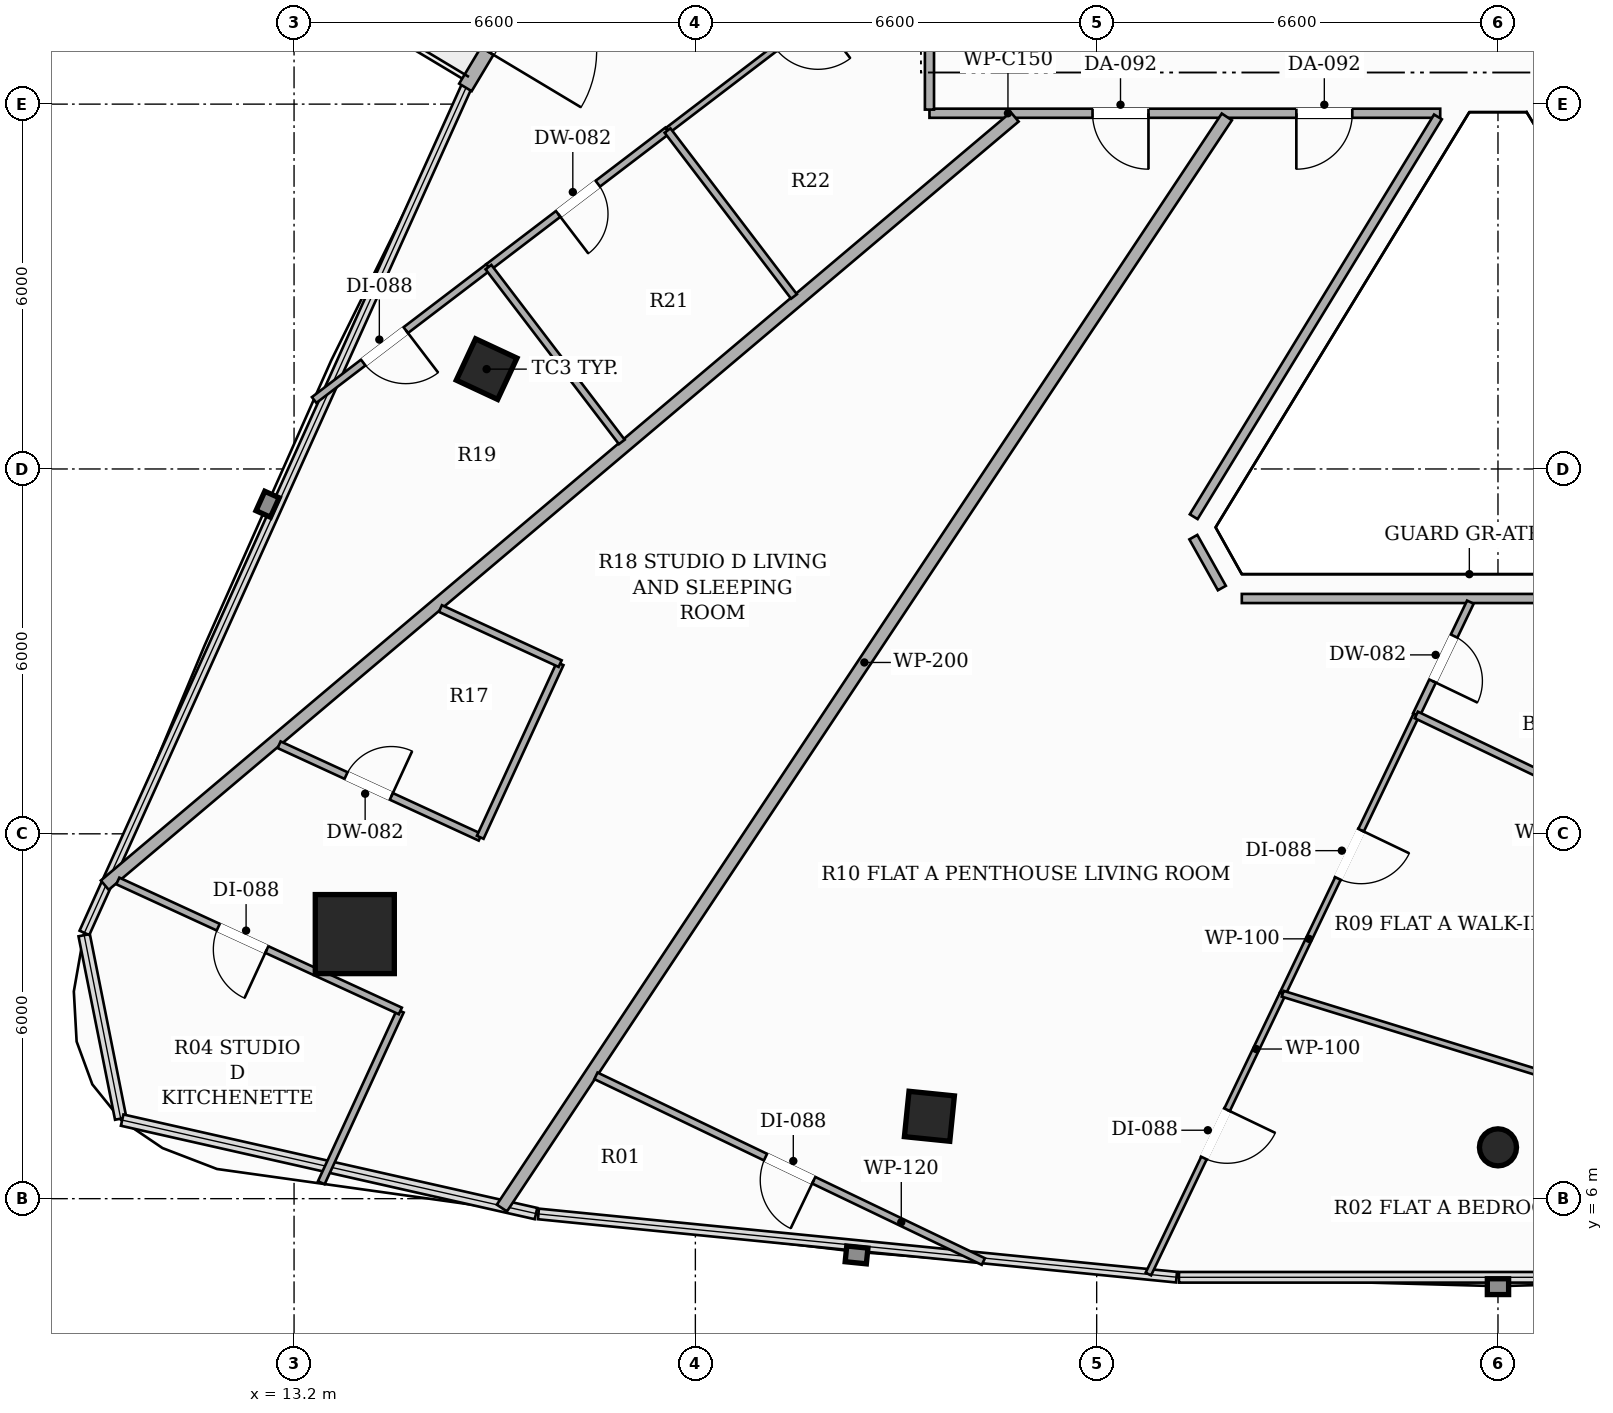
"""IFC4 building model, lengths in metres.
Left out: names, types, materials, properties, quantities, classifications, styles, units other than length and angle.
Written with IfcOpenShell. Run it as: python <this file> out.ifc"""

import sys

from ifc_helpers import new_model, si_unit, direction, frame, frame_2d, origin, origin_2d, place, context, subcontext, project, spatial, rectangle, hollow_rectangle, hollow_circle, extrude, element, fill, save


model = new_model("IFC4")
c1 = context("Model", 3, precision=1e-05, world=origin(), true_north=direction((0.0, 1.0)))
c2 = subcontext(c1, "Body", "Model", "MODEL_VIEW")
j1 = project(units=[si_unit("LENGTHUNIT", "METRE"), si_unit("PLANEANGLEUNIT", "RADIAN")], contexts=[c1])
p1 = place(None, origin())
s1 = spatial("IfcSite", under=j1, at=p1, CompositionType="ELEMENT")
p2 = place(p1, origin())
s2 = spatial("IfcBuilding", under=s1, at=p2, CompositionType="ELEMENT")
p3 = place(p2, frame((0.0, 0.0, 209.6)))
s3 = spatial("IfcBuildingStorey", under=s2, at=p3, CompositionType="ELEMENT", Elevation=209.6)
p4 = place(p3, frame((14.199, 10.351, 0.0), z_axis=(0.0, 0.0, 1.0), x_axis=(1.0, 0.0, 0.0)))
e1 = element("IfcColumn", 1, at=p4, inside=s3, PredefinedType="COLUMN", context=c2, shape_type="SweptSolid", body=[
    extrude(hollow_rectangle(XDim=1.3, YDim=1.3, WallThickness=0.04, at=origin_2d()), origin(), (0.0, 0.0, 1.0), 3.3),
])
for number, where, z_axis, x_axis in (
    (2, (16.367, 19.642, 0.0), (0.0, 0.0, 1.0), (0.423, 0.906, 0.0)),
    (3, (23.649, 7.355, 0.0), (0.0, 0.0, 1.0), (-0.995, 0.101, 0.0)),
):
    element("IfcColumn", number, at=place(p3, frame(where, z_axis=z_axis, x_axis=x_axis)), inside=s3, PredefinedType="COLUMN", context=c2, shape_type="SweptSolid", body=[
        extrude(hollow_rectangle(XDim=0.75, YDim=0.75, WallThickness=0.025, at=origin_2d()), origin(), (0.0, 0.0, 1.0), 3.3),
    ])
p5 = place(p3, frame((33.0, 6.844, 0.0), z_axis=(0.0, 0.0, 1.0), x_axis=(1.0, 0.0, 0.0)))
e4 = element("IfcColumn", 4, at=p5, inside=s3, PredefinedType="COLUMN", context=c2, shape_type="SweptSolid", body=[
    extrude(hollow_circle(Radius=0.305, WallThickness=0.016, at=origin_2d()), origin(), (0.0, 0.0, 1.0), 3.3),
])
p6 = place(p3, frame((21.353, 33.169, 0.0), z_axis=(0.0, 0.0, 1.0), x_axis=(-0.514391899557, -0.857555230682, 0.0)))
e5 = element("IfcWall", 5, at=p6, inside=s3, PredefinedType="SOLIDWALL", context=c2, shape_type="SweptSolid", body=[
    extrude(rectangle(XDim=10.371, YDim=0.24, at=frame_2d((5.186, 0.0))), origin(), (0.0, 0.0, 1.0), 2.624),
])
p7 = place(p6, frame((7.874, 0.0, 0.0)))
e6 = element("IfcOpeningElement", 6, at=p7, cuts=e5, PredefinedType="OPENING", context=c2, shape_type="SweptSolid", body=[
    extrude(rectangle(XDim=1.8, YDim=2.2, at=frame_2d((0.9, 1.1))), frame((0.0, 0.13, 0.0), z_axis=(0.0, -1.0, 0.0), x_axis=(1.0, 0.0, 0.0)), (0.0, 0.0, 1.0), 0.26),
])
p8 = place(p3, frame((32.05, 23.85, 0.0), z_axis=(0.0, 0.0, 1.0), x_axis=(-1.0, 0.0, 0.0)))
e7 = element("IfcWall", 7, at=p8, inside=s3, PredefinedType="PARTITIONING", context=c2, shape_type="SweptSolid", body=[
    extrude(rectangle(XDim=8.4, YDim=0.15, at=frame_2d((4.2, 0.0))), origin(), (0.0, 0.0, 1.0), 2.565),
])
p9 = place(p8, frame((1.446, 0.0, 0.0)))
e8 = element("IfcOpeningElement", 8, at=p9, cuts=e7, PredefinedType="OPENING", context=c2, shape_type="SweptSolid", body=[
    extrude(rectangle(XDim=0.92, YDim=2.15, at=frame_2d((0.46, 1.075))), frame((0.0, 0.085, 0.0), z_axis=(0.0, -1.0, 0.0), x_axis=(1.0, 0.0, 0.0)), (0.0, 0.0, 1.0), 0.17),
])
p10 = place(p8, frame((4.798, 0.0, 0.0)))
e9 = element("IfcOpeningElement", 9, at=p10, cuts=e7, PredefinedType="OPENING", context=c2, shape_type="SweptSolid", body=[
    extrude(rectangle(XDim=0.92, YDim=2.15, at=frame_2d((0.46, 1.075))), frame((0.0, 0.085, 0.0), z_axis=(0.0, -1.0, 0.0), x_axis=(1.0, 0.0, 0.0)), (0.0, 0.0, 1.0), 0.17),
])
p11 = place(p3, frame((23.65, 23.91, 0.0), z_axis=(0.0, 0.0, 1.0), x_axis=(0.0, 1.0, 0.0)))
e10 = element("IfcWall", 10, at=p11, inside=s3, PredefinedType="PARTITIONING", context=c2, shape_type="SweptSolid", body=[
    extrude(rectangle(XDim=12.439, YDim=0.15, at=frame_2d((6.22, 0.0))), origin(), (0.0, 0.0, 1.0), 2.492),
])
p12 = place(p11, frame((5.759, 0.0, 0.0)))
e11 = element("IfcOpeningElement", 11, at=p12, cuts=e10, PredefinedType="OPENING", context=c2, shape_type="SweptSolid", body=[
    extrude(rectangle(XDim=0.92, YDim=2.15, at=frame_2d((0.46, 1.075))), frame((0.0, 0.085, 0.0), z_axis=(0.0, -1.0, 0.0), x_axis=(1.0, 0.0, 0.0)), (0.0, 0.0, 1.0), 0.17),
])
p13 = place(p3, frame((37.213, 15.87, 0.0), z_axis=(0.0, 0.0, 1.0), x_axis=(-1.0, 0.0, 0.0)))
e12 = element("IfcWall", 12, at=p13, inside=s3, PredefinedType="PARTITIONING", context=c2, shape_type="SweptSolid", body=[
    extrude(rectangle(XDim=8.426, YDim=0.15, at=frame_2d((4.213, 0.0))), origin(), (0.0, 0.0, 1.0), 2.773),
])
p14 = place(p3, frame((28.459, 16.042, 0.0), z_axis=(0.0, 0.0, 1.0), x_axis=(-0.488859069364, 0.872362774481, 0.0)))
e13 = element("IfcWall", 13, at=p14, inside=s3, PredefinedType="PARTITIONING", context=c2, shape_type="SweptSolid", body=[
    extrude(rectangle(XDim=0.959, YDim=0.15, at=frame_2d((0.48, 0.0))), origin(), (0.0, 0.0, 1.0), 3.06),
])
p15 = place(p3, frame((27.996, 17.215, 0.0), z_axis=(0.0, 0.0, 1.0), x_axis=(0.521338496894, 0.853349970209, 0.0)))
e14 = element("IfcWall", 14, at=p15, inside=s3, PredefinedType="PARTITIONING", context=c2, shape_type="SweptSolid", body=[
    extrude(rectangle(XDim=7.705, YDim=0.15, at=frame_2d((3.853, 0.0))), origin(), (0.0, 0.0, 1.0), 2.773),
])
p16 = place(p3, frame((16.618, 5.846, 0.0), z_axis=(0.0, 0.0, 1.0), x_axis=(0.553425992232, 0.832898355817, 0.0)))
e15 = element("IfcWall", 15, at=p16, inside=s3, PredefinedType="PARTITIONING", context=c2, shape_type="SweptSolid", body=[
    extrude(rectangle(XDim=21.544, YDim=0.2, at=frame_2d((10.772, 0.0))), origin(), (0.0, 0.0, 1.0), 2.492),
])
p17 = place(p3, frame((10.087, 11.156, 0.0), z_axis=(0.0, 0.0, 1.0), x_axis=(0.76410924632, 0.645086862127, 0.0)))
e16 = element("IfcWall", 16, at=p17, inside=s3, PredefinedType="PARTITIONING", context=c2, shape_type="SweptSolid", body=[
    extrude(rectangle(XDim=19.585, YDim=0.2, at=frame_2d((9.792, 0.0))), origin(), (0.0, 0.0, 1.0), 2.492),
])
p18 = place(p3, frame((32.546, 15.81, 0.0), z_axis=(0.0, 0.0, 1.0), x_axis=(-0.43214833388, -0.90180253799, 0.0)))
e17 = element("IfcWall", 17, at=p18, inside=s3, PredefinedType="PARTITIONING", context=c2, shape_type="SweptSolid", body=[
    extrude(rectangle(XDim=2.057, YDim=0.12, at=frame_2d((1.028, 0.0))), origin(), (0.0, 0.0, 1.0), 3.06),
])
p19 = place(p18, frame((0.619, 0.0, 0.0)))
e18 = element("IfcOpeningElement", 18, at=p19, cuts=e17, PredefinedType="OPENING", context=c2, shape_type="SweptSolid", body=[
    extrude(rectangle(XDim=0.82, YDim=2.1, at=frame_2d((0.41, 1.05))), frame((0.0, 0.07, 0.0), z_axis=(0.0, -1.0, 0.0), x_axis=(1.0, 0.0, 0.0)), (0.0, 0.0, 1.0), 0.14),
])
p20 = place(p3, frame((24.536, 4.966, 0.0), z_axis=(0.0, 0.0, 1.0), x_axis=(-0.901746721557, 0.432264791721, 0.0)))
e19 = element("IfcWall", 19, at=p20, inside=s3, PredefinedType="PARTITIONING", context=c2, shape_type="SweptSolid", body=[
    extrude(rectangle(XDim=7.065, YDim=0.12, at=frame_2d((3.532, 0.0))), origin(), (0.0, 0.0, 1.0), 2.619),
])
p21 = place(p20, frame((3.093, 0.0, 0.0)))
e20 = element("IfcOpeningElement", 20, at=p21, cuts=e19, PredefinedType="OPENING", context=c2, shape_type="SweptSolid", body=[
    extrude(rectangle(XDim=0.88, YDim=2.1, at=frame_2d((0.44, 1.05))), frame((0.0, 0.07, 0.0), z_axis=(0.0, -1.0, 0.0), x_axis=(1.0, 0.0, 0.0)), (0.0, 0.0, 1.0), 0.14),
])
p22 = place(p3, frame((29.459, 9.37, 0.0), z_axis=(0.0, 0.0, 1.0), x_axis=(-0.43211613455, -0.901817967364, 0.0)))
e21 = element("IfcWall", 21, at=p22, inside=s3, PredefinedType="PARTITIONING", context=c2, shape_type="SweptSolid", body=[
    extrude(rectangle(XDim=5.112, YDim=0.1, at=frame_2d((2.556, 0.0))), origin(), (0.0, 0.0, 1.0), 2.492),
])
p23 = place(p22, frame((2.116, 0.0, 0.0)))
e22 = element("IfcOpeningElement", 22, at=p23, cuts=e21, PredefinedType="OPENING", context=c2, shape_type="SweptSolid", body=[
    extrude(rectangle(XDim=0.88, YDim=2.1, at=frame_2d((0.44, 1.05))), frame((0.0, 0.06, 0.0), z_axis=(0.0, -1.0, 0.0), x_axis=(1.0, 0.0, 0.0)), (0.0, 0.0, 1.0), 0.12),
])
p24 = place(p3, frame((31.657, 13.955, 0.0), z_axis=(0.0, 0.0, 1.0), x_axis=(-0.4322861352, -0.901736489954, 0.0)))
e23 = element("IfcWall", 23, at=p24, inside=s3, PredefinedType="PARTITIONING", context=c2, shape_type="SweptSolid", body=[
    extrude(rectangle(XDim=5.084, YDim=0.1, at=frame_2d((2.542, 0.0))), origin(), (0.0, 0.0, 1.0), 3.06),
])
p25 = place(p24, frame((2.102, 0.0, 0.0)))
e24 = element("IfcOpeningElement", 24, at=p25, cuts=e23, PredefinedType="OPENING", context=c2, shape_type="SweptSolid", body=[
    extrude(rectangle(XDim=0.88, YDim=2.1, at=frame_2d((0.44, 1.05))), frame((0.0, 0.06, 0.0), z_axis=(0.0, -1.0, 0.0), x_axis=(1.0, 0.0, 0.0)), (0.0, 0.0, 1.0), 0.12),
])
p26 = place(p3, frame((36.133, 11.81, 0.0), z_axis=(0.0, 0.0, 1.0), x_axis=(-0.901797658679, 0.432158515826, 0.0)))
e25 = element("IfcWall", 25, at=p26, inside=s3, PredefinedType="PARTITIONING", context=c2, shape_type="SweptSolid", body=[
    extrude(rectangle(XDim=4.964, YDim=0.12, at=frame_2d((2.482, 0.0))), origin(), (0.0, 0.0, 1.0), 2.773),
])
p27 = place(p3, frame((29.459, 9.37, 0.0), z_axis=(0.0, 0.0, 1.0), x_axis=(0.955559226726, -0.294799193044, 0.0)))
e26 = element("IfcWall", 26, at=p27, inside=s3, PredefinedType="PARTITIONING", context=c2, shape_type="SweptSolid", body=[
    extrude(rectangle(XDim=7.839, YDim=0.1, at=frame_2d((3.92, 0.0))), origin(), (0.0, 0.0, 1.0), 2.492),
])
p28 = place(p3, frame((12.954, 13.465, 0.0), z_axis=(0.0, 0.0, 1.0), x_axis=(0.908453283004, -0.41798640241, 0.0)))
e27 = element("IfcWall", 27, at=p28, inside=s3, PredefinedType="PARTITIONING", context=c2, shape_type="SweptSolid", body=[
    extrude(rectangle(XDim=3.641, YDim=0.12, at=frame_2d((1.821, 0.0))), origin(), (0.0, 0.0, 1.0), 2.492),
])
p29 = place(p28, frame((1.212, 0.0, 0.0)))
e28 = element("IfcOpeningElement", 28, at=p29, cuts=e27, PredefinedType="OPENING", context=c2, shape_type="SweptSolid", body=[
    extrude(rectangle(XDim=0.82, YDim=2.1, at=frame_2d((0.41, 1.05))), frame((0.0, 0.07, 0.0), z_axis=(0.0, -1.0, 0.0), x_axis=(1.0, 0.0, 0.0)), (0.0, 0.0, 1.0), 0.14),
])
p30 = place(p3, frame((16.262, 11.943, 0.0), z_axis=(0.0, 0.0, 1.0), x_axis=(0.417964576431, 0.908463324988, 0.0)))
e29 = element("IfcWall", 29, at=p30, inside=s3, PredefinedType="PARTITIONING", context=c2, shape_type="SweptSolid", body=[
    extrude(rectangle(XDim=3.144, YDim=0.12, at=frame_2d((1.572, 0.0))), origin(), (0.0, 0.0, 1.0), 2.565),
])
p31 = place(p3, frame((17.576, 14.799, 0.0), z_axis=(0.0, 0.0, 1.0), x_axis=(-0.908443405033, 0.418007870562, 0.0)))
e30 = element("IfcWall", 30, at=p31, inside=s3, PredefinedType="PARTITIONING", context=c2, shape_type="SweptSolid", body=[
    extrude(rectangle(XDim=2.167, YDim=0.12, at=frame_2d((1.084, 0.0))), origin(), (0.0, 0.0, 1.0), 2.492),
])
p32 = place(p3, frame((13.648, 6.262, 0.0), z_axis=(0.0, 0.0, 1.0), x_axis=(0.418057228076, 0.90842069222, 0.0)))
e31 = element("IfcWall", 31, at=p32, inside=s3, PredefinedType="PARTITIONING", context=c2, shape_type="SweptSolid", body=[
    extrude(rectangle(XDim=3.11, YDim=0.12, at=frame_2d((1.555, 0.0))), origin(), (0.0, 0.0, 1.0), 3.06),
])
p33 = place(p3, frame((14.948, 9.087, 0.0), z_axis=(0.0, 0.0, 1.0), x_axis=(-0.908447683715, 0.417998571712, 0.0)))
e32 = element("IfcWall", 32, at=p33, inside=s3, PredefinedType="PARTITIONING", context=c2, shape_type="SweptSolid", body=[
    extrude(rectangle(XDim=5.115, YDim=0.12, at=frame_2d((2.558, 0.0))), origin(), (0.0, 0.0, 1.0), 3.06),
])
p34 = place(p33, frame((2.417, 0.0, 0.0)))
e33 = element("IfcOpeningElement", 33, at=p34, cuts=e32, PredefinedType="OPENING", context=c2, shape_type="SweptSolid", body=[
    extrude(rectangle(XDim=0.88, YDim=2.1, at=frame_2d((0.44, 1.05))), frame((0.0, 0.07, 0.0), z_axis=(0.0, -1.0, 0.0), x_axis=(1.0, 0.0, 0.0)), (0.0, 0.0, 1.0), 0.14),
])
p35 = place(p3, frame((19.342, 23.566, 0.0), z_axis=(0.0, 0.0, 1.0), x_axis=(-0.795172892053, -0.606382776589, 0.0)))
e34 = element("IfcWall", 34, at=p35, inside=s3, PredefinedType="PARTITIONING", context=c2, shape_type="SweptSolid", body=[
    extrude(rectangle(XDim=3.704, YDim=0.12, at=frame_2d((1.852, 0.0))), origin(), (0.0, 0.0, 1.0), 2.492),
])
p36 = place(p35, frame((1.442, 0.0, 0.0)))
e35 = element("IfcOpeningElement", 35, at=p36, cuts=e34, PredefinedType="OPENING", context=c2, shape_type="SweptSolid", body=[
    extrude(rectangle(XDim=0.82, YDim=2.1, at=frame_2d((0.41, 1.05))), frame((0.0, 0.07, 0.0), z_axis=(0.0, -1.0, 0.0), x_axis=(1.0, 0.0, 0.0)), (0.0, 0.0, 1.0), 0.14),
])
p37 = place(p3, frame((16.397, 21.32, 0.0), z_axis=(0.0, 0.0, 1.0), x_axis=(-0.795204709159, -0.606341051333, 0.0)))
e36 = element("IfcWall", 36, at=p37, inside=s3, PredefinedType="PARTITIONING", context=c2, shape_type="SweptSolid", body=[
    extrude(rectangle(XDim=3.605, YDim=0.12, at=frame_2d((1.803, 0.0))), origin(), (0.0, 0.0, 1.0), 3.06),
])
p38 = place(p37, frame((1.71, 0.0, 0.0)))
e37 = element("IfcOpeningElement", 37, at=p38, cuts=e36, PredefinedType="OPENING", context=c2, shape_type="SweptSolid", body=[
    extrude(rectangle(XDim=0.88, YDim=2.1, at=frame_2d((0.44, 1.05))), frame((0.0, 0.07, 0.0), z_axis=(0.0, -1.0, 0.0), x_axis=(1.0, 0.0, 0.0)), (0.0, 0.0, 1.0), 0.14),
])
p39 = place(p3, frame((23.59, 26.805, 0.0), z_axis=(0.0, 0.0, 1.0), x_axis=(-0.795214502583, -0.606328207228, 0.0)))
e38 = element("IfcWall", 38, at=p39, inside=s3, PredefinedType="PARTITIONING", context=c2, shape_type="SweptSolid", body=[
    extrude(rectangle(XDim=5.342, YDim=0.1, at=frame_2d((2.671, 0.0))), origin(), (0.0, 0.0, 1.0), 2.773),
])
p40 = place(p39, frame((2.231, 0.0, 0.0)))
e39 = element("IfcOpeningElement", 39, at=p40, cuts=e38, PredefinedType="OPENING", context=c2, shape_type="SweptSolid", body=[
    extrude(rectangle(XDim=0.88, YDim=2.1, at=frame_2d((0.44, 1.05))), frame((0.0, 0.06, 0.0), z_axis=(0.0, -1.0, 0.0), x_axis=(1.0, 0.0, 0.0)), (0.0, 0.0, 1.0), 0.12),
])
p41 = place(p3, frame((18.59, 18.445, 0.0), z_axis=(0.0, 0.0, 1.0), x_axis=(-0.606504882674, 0.795079761591, 0.0)))
e40 = element("IfcWall", 40, at=p41, inside=s3, PredefinedType="PARTITIONING", context=c2, shape_type="SweptSolid", body=[
    extrude(rectangle(XDim=3.616, YDim=0.12, at=frame_2d((1.808, 0.0))), origin(), (0.0, 0.0, 1.0), 2.492),
])
p42 = place(p3, frame((19.342, 23.566, 0.0), z_axis=(0.0, 0.0, 1.0), x_axis=(0.60619754922, -0.795314108589, 0.0)))
e41 = element("IfcWall", 41, at=p42, inside=s3, PredefinedType="PARTITIONING", context=c2, shape_type="SweptSolid", body=[
    extrude(rectangle(XDim=3.431, YDim=0.12, at=frame_2d((1.716, 0.0))), origin(), (0.0, 0.0, 1.0), 2.773),
])
p43 = place(p9, origin())
e42 = element("IfcDoor", 42, at=p43, inside=s3, OperationType="SINGLE_SWING_RIGHT", PredefinedType="DOOR", context=c2, shape_type="SweptSolid", body=[
    extrude(rectangle(XDim=0.92, YDim=2.15, at=frame_2d((0.46, 1.075))), frame((0.0, 0.025, 0.0), z_axis=(0.0, -1.0, 0.0), x_axis=(1.0, 0.0, 0.0)), (0.0, 0.0, 1.0), 0.05),
])
fill(e8, e42)
p44 = place(p19, origin())
e43 = element("IfcDoor", 43, at=p44, inside=s3, OperationType="SINGLE_SWING_RIGHT", PredefinedType="DOOR", context=c2, shape_type="SweptSolid", body=[
    extrude(rectangle(XDim=0.82, YDim=2.1, at=frame_2d((0.41, 1.05))), frame((0.0, 0.025, 0.0), z_axis=(0.0, -1.0, 0.0), x_axis=(1.0, 0.0, 0.0)), (0.0, 0.0, 1.0), 0.05),
])
fill(e18, e43)
p45 = place(p21, origin())
e44 = element("IfcDoor", 44, at=p45, inside=s3, OperationType="SINGLE_SWING_LEFT", PredefinedType="DOOR", context=c2, shape_type="SweptSolid", body=[
    extrude(rectangle(XDim=0.88, YDim=2.1, at=frame_2d((0.44, 1.05))), frame((0.0, 0.025, 0.0), z_axis=(0.0, -1.0, 0.0), x_axis=(1.0, 0.0, 0.0)), (0.0, 0.0, 1.0), 0.05),
])
fill(e20, e44)
p46 = place(p23, origin())
e45 = element("IfcDoor", 45, at=p46, inside=s3, OperationType="SINGLE_SWING_LEFT", PredefinedType="DOOR", context=c2, shape_type="SweptSolid", body=[
    extrude(rectangle(XDim=0.88, YDim=2.1, at=frame_2d((0.44, 1.05))), frame((0.0, 0.025, 0.0), z_axis=(0.0, -1.0, 0.0), x_axis=(1.0, 0.0, 0.0)), (0.0, 0.0, 1.0), 0.05),
])
fill(e22, e45)
p47 = place(p25, origin())
e46 = element("IfcDoor", 46, at=p47, inside=s3, OperationType="SINGLE_SWING_LEFT", PredefinedType="DOOR", context=c2, shape_type="SweptSolid", body=[
    extrude(rectangle(XDim=0.88, YDim=2.1, at=frame_2d((0.44, 1.05))), frame((0.0, 0.025, 0.0), z_axis=(0.0, -1.0, 0.0), x_axis=(1.0, 0.0, 0.0)), (0.0, 0.0, 1.0), 0.05),
])
fill(e24, e46)
p48 = place(p10, origin())
e47 = element("IfcDoor", 47, at=p48, inside=s3, OperationType="SINGLE_SWING_LEFT", PredefinedType="DOOR", context=c2, shape_type="SweptSolid", body=[
    extrude(rectangle(XDim=0.92, YDim=2.15, at=frame_2d((0.46, 1.075))), frame((0.0, 0.025, 0.0), z_axis=(0.0, -1.0, 0.0), x_axis=(1.0, 0.0, 0.0)), (0.0, 0.0, 1.0), 0.05),
])
fill(e9, e47)
p49 = place(p29, origin())
e48 = element("IfcDoor", 48, at=p49, inside=s3, OperationType="SINGLE_SWING_RIGHT", PredefinedType="DOOR", context=c2, shape_type="SweptSolid", body=[
    extrude(rectangle(XDim=0.82, YDim=2.1, at=frame_2d((0.41, 1.05))), frame((0.0, 0.025, 0.0), z_axis=(0.0, -1.0, 0.0), x_axis=(1.0, 0.0, 0.0)), (0.0, 0.0, 1.0), 0.05),
])
fill(e28, e48)
p50 = place(p34, origin())
e49 = element("IfcDoor", 49, at=p50, inside=s3, OperationType="SINGLE_SWING_LEFT", PredefinedType="DOOR", context=c2, shape_type="SweptSolid", body=[
    extrude(rectangle(XDim=0.88, YDim=2.1, at=frame_2d((0.44, 1.05))), frame((0.0, 0.025, 0.0), z_axis=(0.0, -1.0, 0.0), x_axis=(1.0, 0.0, 0.0)), (0.0, 0.0, 1.0), 0.05),
])
fill(e33, e49)
p51 = place(p36, origin())
e50 = element("IfcDoor", 50, at=p51, inside=s3, OperationType="SINGLE_SWING_RIGHT", PredefinedType="DOOR", context=c2, shape_type="SweptSolid", body=[
    extrude(rectangle(XDim=0.82, YDim=2.1, at=frame_2d((0.41, 1.05))), frame((0.0, 0.025, 0.0), z_axis=(0.0, -1.0, 0.0), x_axis=(1.0, 0.0, 0.0)), (0.0, 0.0, 1.0), 0.05),
])
fill(e35, e50)
p52 = place(p38, origin())
e51 = element("IfcDoor", 51, at=p52, inside=s3, OperationType="SINGLE_SWING_LEFT", PredefinedType="DOOR", context=c2, shape_type="SweptSolid", body=[
    extrude(rectangle(XDim=0.88, YDim=2.1, at=frame_2d((0.44, 1.05))), frame((0.0, 0.025, 0.0), z_axis=(0.0, -1.0, 0.0), x_axis=(1.0, 0.0, 0.0)), (0.0, 0.0, 1.0), 0.05),
])
fill(e37, e51)
save(model, sys.argv[1])
